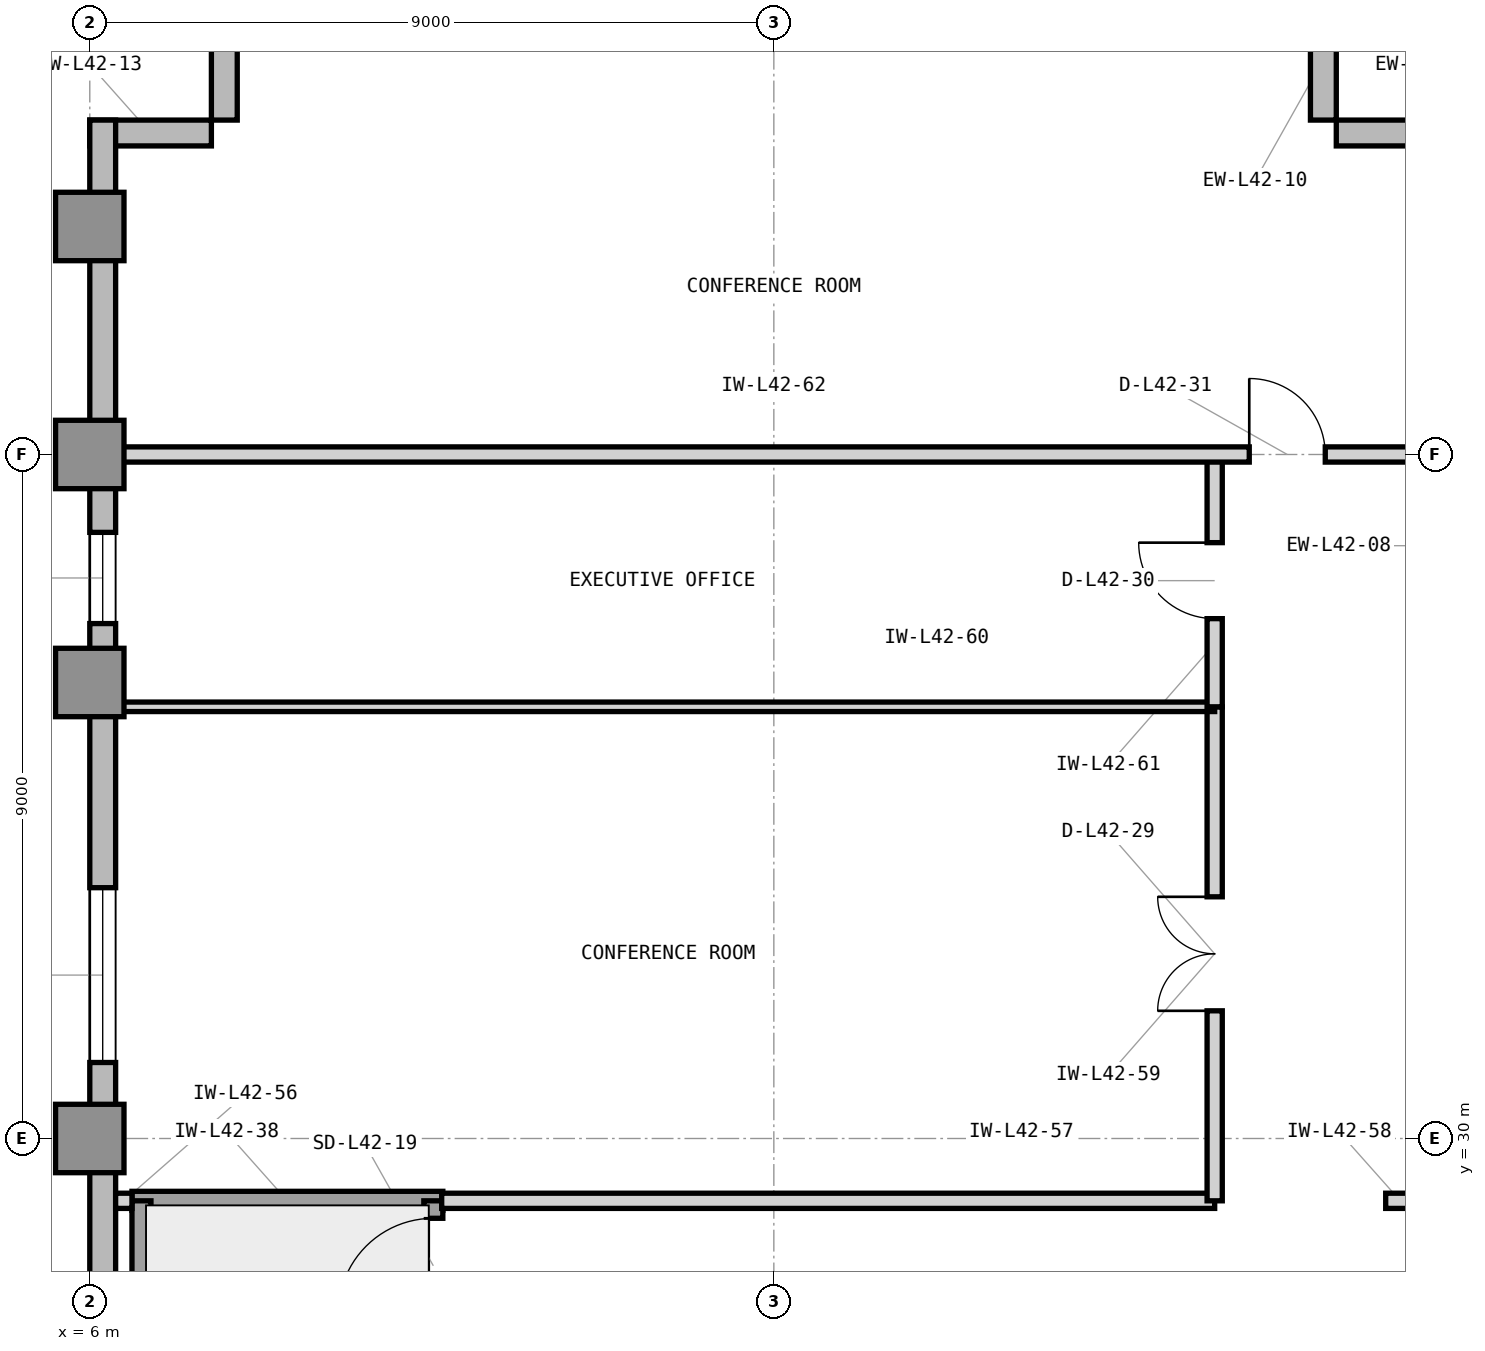
"""IFC4 building model, lengths in metres.
Left out: names, types, materials, properties, quantities, classifications, styles, units other than length and angle.
Written with IfcOpenShell. Run it as: python <this file> out.ifc"""

import sys

from ifc_helpers import new_model, si_unit, direction, frame, frame_2d, origin, origin_2d, place, context, subcontext, project, spatial, rectangle, extrude, element, fill, save


model = new_model("IFC4")
c1 = context("Model", 3, precision=1e-05, world=origin(), true_north=direction((0.0, 1.0)))
c2 = subcontext(c1, "Body", "Model", "MODEL_VIEW")
j1 = project(units=[si_unit("LENGTHUNIT", "METRE"), si_unit("PLANEANGLEUNIT", "RADIAN")], contexts=[c1])
p1 = place(None, origin())
s1 = spatial("IfcSite", under=j1, at=p1, CompositionType="ELEMENT")
p2 = place(p1, origin())
s2 = spatial("IfcBuilding", under=s1, at=p2, CompositionType="ELEMENT")
p3 = place(p2, frame((0.0, 0.0, 176.1)))
s3 = spatial("IfcBuildingStorey", under=s2, at=p3, CompositionType="ELEMENT", Elevation=176.1)
for number, where, z_axis, x_axis in (
    (1, (6.0, 30.0, 0.0), (0.0, 0.0, 1.0), (1.0, 0.0, 0.0)),
    (2, (6.0, 36.0, 0.0), (0.0, 0.0, 1.0), (1.0, 0.0, 0.0)),
    (3, (6.0, 39.0, 0.0), (0.0, 0.0, 1.0), (1.0, 0.0, 0.0)),
    (4, (6.0, 42.0, 0.0), (0.0, 0.0, 1.0), (1.0, 0.0, 0.0)),
):
    element("IfcColumn", number, at=place(p3, frame(where, z_axis=z_axis, x_axis=x_axis)), inside=s3, PredefinedType="COLUMN", context=c2, shape_type="SweptSolid", body=[
        extrude(rectangle(XDim=0.9, YDim=0.9, at=origin_2d()), origin(), (0.0, 0.0, 1.0), 3.9),
    ])
for number, where, z_axis, x_axis in (
    (5, (24.0, 43.23, 0.0), (0.0, 0.0, 1.0), (-1.0, 0.0, 0.0)),
    (6, (22.23, 43.4, 0.0), (0.0, 0.0, 1.0), (0.0, 1.0, 0.0)),
    (7, (7.77, 45.0, 0.0), (0.0, 0.0, 1.0), (0.0, -1.0, 0.0)),
    (8, (7.6, 43.23, 0.0), (0.0, 0.0, 1.0), (-1.0, 0.0, 0.0)),
):
    element("IfcWall", number, at=place(p3, frame(where, z_axis=z_axis, x_axis=x_axis)), inside=s3, PredefinedType="STANDARD", context=c2, shape_type="SweptSolid", body=[
        extrude(rectangle(XDim=1.6, YDim=0.34, at=frame_2d((0.8, 0.0))), origin(), (0.0, 0.0, 1.0), 3.7),
    ])
p4 = place(p3, frame((6.17, 43.4, 0.0), z_axis=(0.0, 0.0, 1.0), x_axis=(0.0, -1.0, 0.0)))
e9 = element("IfcWall", 9, at=p4, inside=s3, PredefinedType="STANDARD", context=c2, shape_type="SweptSolid", body=[
    extrude(rectangle(XDim=22.5, YDim=0.34, at=frame_2d((11.25, 0.0))), origin(), (0.0, 0.0, 1.0), 3.7),
])
p5 = place(p4, frame((10.1, 0.0, 0.9)))
e10 = element("IfcOpeningElement", 10, at=p5, cuts=e9, PredefinedType="OPENING", context=c2, shape_type="SweptSolid", body=[
    extrude(rectangle(XDim=2.3, YDim=2.2, at=frame_2d((1.15, 1.1))), frame((0.0, 0.18, 0.0), z_axis=(0.0, -1.0, 0.0), x_axis=(1.0, 0.0, 0.0)), (0.0, 0.0, 1.0), 0.36),
])
p6 = place(p4, frame((5.425, 0.0, 0.9)))
e11 = element("IfcOpeningElement", 11, at=p6, cuts=e9, PredefinedType="OPENING", context=c2, shape_type="SweptSolid", body=[
    extrude(rectangle(XDim=1.2, YDim=2.2, at=frame_2d((0.6, 1.1))), frame((0.0, 0.18, 0.0), z_axis=(0.0, -1.0, 0.0), x_axis=(1.0, 0.0, 0.0)), (0.0, 0.0, 1.0), 0.36),
])
p7 = place(p3, frame((6.555, 29.18, 0.0), z_axis=(0.0, 0.0, 1.0), x_axis=(1.0, 0.0, 0.0)))
e12 = element("IfcWall", 12, at=p7, inside=s3, PredefinedType="SHEAR", context=c2, shape_type="SweptSolid", body=[
    extrude(rectangle(XDim=4.09, YDim=0.25, at=frame_2d((2.045, 0.0))), origin(), (0.0, 0.0, 1.0), 3.9),
])
p8 = place(p3, frame((6.68, 21.68, 0.0), z_axis=(0.0, 0.0, 1.0), x_axis=(0.0, 1.0, 0.0)))
e13 = element("IfcWall", 13, at=p8, inside=s3, PredefinedType="SHEAR", context=c2, shape_type="SweptSolid", body=[
    extrude(rectangle(XDim=7.5, YDim=0.25, at=frame_2d((3.75, 0.0))), origin(), (0.0, 0.0, 1.0), 3.9),
])
p9 = place(p3, frame((10.52, 21.68, 0.0), z_axis=(0.0, 0.0, 1.0), x_axis=(0.0, 1.0, 0.0)))
e14 = element("IfcWall", 14, at=p9, inside=s3, PredefinedType="SHEAR", context=c2, shape_type="SweptSolid", body=[
    extrude(rectangle(XDim=7.5, YDim=0.25, at=frame_2d((3.75, 0.0))), origin(), (0.0, 0.0, 1.0), 3.9),
])
p10 = place(p9, frame((6.02, 0.0, 0.0)))
e15 = element("IfcOpeningElement", 15, at=p10, cuts=e14, PredefinedType="OPENING", context=c2, shape_type="SweptSolid", body=[
    extrude(rectangle(XDim=1.25, YDim=2.2, at=frame_2d((0.625, 1.1))), frame((0.0, 0.135, 0.0), z_axis=(0.0, -1.0, 0.0), x_axis=(1.0, 0.0, 0.0)), (0.0, 0.0, 1.0), 0.27),
])
p11 = place(p3, frame((6.34, 29.18, 0.0), z_axis=(0.0, 0.0, 1.0), x_axis=(1.0, 0.0, 0.0)))
e16 = element("IfcWall", 16, at=p11, inside=s3, PredefinedType="PARTITIONING", context=c2, shape_type="SweptSolid", body=[
    extrude(rectangle(XDim=0.215, YDim=0.2, at=frame_2d((0.107, 0.0))), origin(), (0.0, 0.0, 1.0), 3.69),
])
p12 = place(p3, frame((10.63, 29.18, 0.0), z_axis=(0.0, 0.0, 1.0), x_axis=(1.0, 0.0, 0.0)))
e17 = element("IfcWall", 17, at=p12, inside=s3, PredefinedType="PARTITIONING", context=c2, shape_type="SweptSolid", body=[
    extrude(rectangle(XDim=10.17, YDim=0.2, at=frame_2d((5.085, 0.0))), origin(), (0.0, 0.0, 1.0), 3.69),
])
p13 = place(p3, frame((23.05, 29.18, 0.0), z_axis=(0.0, 0.0, 1.0), x_axis=(1.0, 0.0, 0.0)))
e18 = element("IfcWall", 18, at=p13, inside=s3, PredefinedType="PARTITIONING", context=c2, shape_type="SweptSolid", body=[
    extrude(rectangle(XDim=0.77, YDim=0.2, at=frame_2d((0.385, 0.0))), origin(), (0.0, 0.0, 1.0), 3.69),
])
p14 = place(p3, frame((20.8, 29.18, 0.0), z_axis=(0.0, 0.0, 1.0), x_axis=(0.0, 1.0, 0.0)))
e19 = element("IfcWall", 19, at=p14, inside=s3, PredefinedType="PARTITIONING", context=c2, shape_type="SweptSolid", body=[
    extrude(rectangle(XDim=6.5, YDim=0.2, at=frame_2d((3.25, 0.0))), origin(), (0.0, 0.0, 1.0), 3.69),
])
p15 = place(p14, frame((2.5, 0.0, 0.0)))
e20 = element("IfcOpeningElement", 20, at=p15, cuts=e19, PredefinedType="OPENING", context=c2, shape_type="SweptSolid", body=[
    extrude(rectangle(XDim=1.5, YDim=2.3, at=frame_2d((0.75, 1.15))), frame((0.0, 0.11, 0.0), z_axis=(0.0, -1.0, 0.0), x_axis=(1.0, 0.0, 0.0)), (0.0, 0.0, 1.0), 0.22),
])
p16 = place(p3, frame((6.18, 35.68, 0.0), z_axis=(0.0, 0.0, 1.0), x_axis=(1.0, 0.0, 0.0)))
e21 = element("IfcWall", 21, at=p16, inside=s3, PredefinedType="PARTITIONING", context=c2, shape_type="SweptSolid", body=[
    extrude(rectangle(XDim=14.62, YDim=0.125, at=frame_2d((7.31, 0.0))), origin(), (0.0, 0.0, 1.0), 3.69),
])
p17 = place(p3, frame((20.8, 35.68, 0.0), z_axis=(0.0, 0.0, 1.0), x_axis=(0.0, 1.0, 0.0)))
e22 = element("IfcWall", 22, at=p17, inside=s3, PredefinedType="PARTITIONING", context=c2, shape_type="SweptSolid", body=[
    extrude(rectangle(XDim=3.32, YDim=0.2, at=frame_2d((1.66, 0.0))), origin(), (0.0, 0.0, 1.0), 3.69),
])
p18 = place(p17, frame((1.16, 0.0, 0.0)))
e23 = element("IfcOpeningElement", 23, at=p18, cuts=e22, PredefinedType="OPENING", context=c2, shape_type="SweptSolid", body=[
    extrude(rectangle(XDim=1.0, YDim=2.15, at=frame_2d((0.5, 1.075))), frame((0.0, 0.11, 0.0), z_axis=(0.0, -1.0, 0.0), x_axis=(1.0, 0.0, 0.0)), (0.0, 0.0, 1.0), 0.22),
])
p19 = place(p3, frame((6.18, 39.0, 0.0), z_axis=(0.0, 0.0, 1.0), x_axis=(1.0, 0.0, 0.0)))
e24 = element("IfcWall", 24, at=p19, inside=s3, PredefinedType="PARTITIONING", context=c2, shape_type="SweptSolid", body=[
    extrude(rectangle(XDim=17.64, YDim=0.2, at=frame_2d((8.82, 0.0))), origin(), (0.0, 0.0, 1.0), 3.073),
])
p20 = place(p19, frame((15.075, 0.0, 0.0)))
e25 = element("IfcOpeningElement", 25, at=p20, cuts=e24, PredefinedType="OPENING", context=c2, shape_type="SweptSolid", body=[
    extrude(rectangle(XDim=1.0, YDim=2.15, at=frame_2d((0.5, 1.075))), frame((0.0, 0.11, 0.0), z_axis=(0.0, -1.0, 0.0), x_axis=(1.0, 0.0, 0.0)), (0.0, 0.0, 1.0), 0.22),
])
p21 = place(p5, origin())
e26 = element("IfcWindow", 26, at=p21, inside=s3, PartitioningType="SINGLE_PANEL", PredefinedType="WINDOW", context=c2, shape_type="SweptSolid", body=[
    extrude(rectangle(XDim=2.3, YDim=2.2, at=frame_2d((1.15, 1.1))), frame((0.0, 0.11, 0.0), z_axis=(0.0, -1.0, 0.0), x_axis=(1.0, 0.0, 0.0)), (0.0, 0.0, 1.0), 0.06),
])
fill(e10, e26)
p22 = place(p10, origin())
e27 = element("IfcDoor", 27, at=p22, inside=s3, OperationType="SINGLE_SWING_LEFT", PredefinedType="DOOR", context=c2, shape_type="SweptSolid", body=[
    extrude(rectangle(XDim=1.25, YDim=2.2, at=frame_2d((0.625, 1.1))), frame((0.0, 0.025, 0.0), z_axis=(0.0, -1.0, 0.0), x_axis=(1.0, 0.0, 0.0)), (0.0, 0.0, 1.0), 0.05),
])
fill(e15, e27)
p23 = place(p15, origin())
e28 = element("IfcDoor", 28, at=p23, inside=s3, OperationType="DOUBLE_DOOR_SINGLE_SWING", PredefinedType="DOOR", context=c2, shape_type="SweptSolid", body=[
    extrude(rectangle(XDim=1.5, YDim=2.3, at=frame_2d((0.75, 1.15))), frame((0.0, 0.025, 0.0), z_axis=(0.0, -1.0, 0.0), x_axis=(1.0, 0.0, 0.0)), (0.0, 0.0, 1.0), 0.05),
])
fill(e20, e28)
p24 = place(p18, origin())
e29 = element("IfcDoor", 29, at=p24, inside=s3, OperationType="SINGLE_SWING_RIGHT", PredefinedType="DOOR", context=c2, shape_type="SweptSolid", body=[
    extrude(rectangle(XDim=1.0, YDim=2.15, at=frame_2d((0.5, 1.075))), frame((0.0, 0.025, 0.0), z_axis=(0.0, -1.0, 0.0), x_axis=(1.0, 0.0, 0.0)), (0.0, 0.0, 1.0), 0.05),
])
fill(e23, e29)
p25 = place(p20, origin())
e30 = element("IfcDoor", 30, at=p25, inside=s3, OperationType="SINGLE_SWING_LEFT", PredefinedType="DOOR", context=c2, shape_type="SweptSolid", body=[
    extrude(rectangle(XDim=1.0, YDim=2.15, at=frame_2d((0.5, 1.075))), frame((0.0, 0.025, 0.0), z_axis=(0.0, -1.0, 0.0), x_axis=(1.0, 0.0, 0.0)), (0.0, 0.0, 1.0), 0.05),
])
fill(e25, e30)
p26 = place(p6, origin())
e31 = element("IfcWindow", 31, at=p26, inside=s3, PartitioningType="SINGLE_PANEL", PredefinedType="WINDOW", context=c2, shape_type="SweptSolid", body=[
    extrude(rectangle(XDim=1.2, YDim=2.2, at=frame_2d((0.6, 1.1))), frame((0.0, 0.11, 0.0), z_axis=(0.0, -1.0, 0.0), x_axis=(1.0, 0.0, 0.0)), (0.0, 0.0, 1.0), 0.06),
])
fill(e11, e31)
save(model, sys.argv[1])
